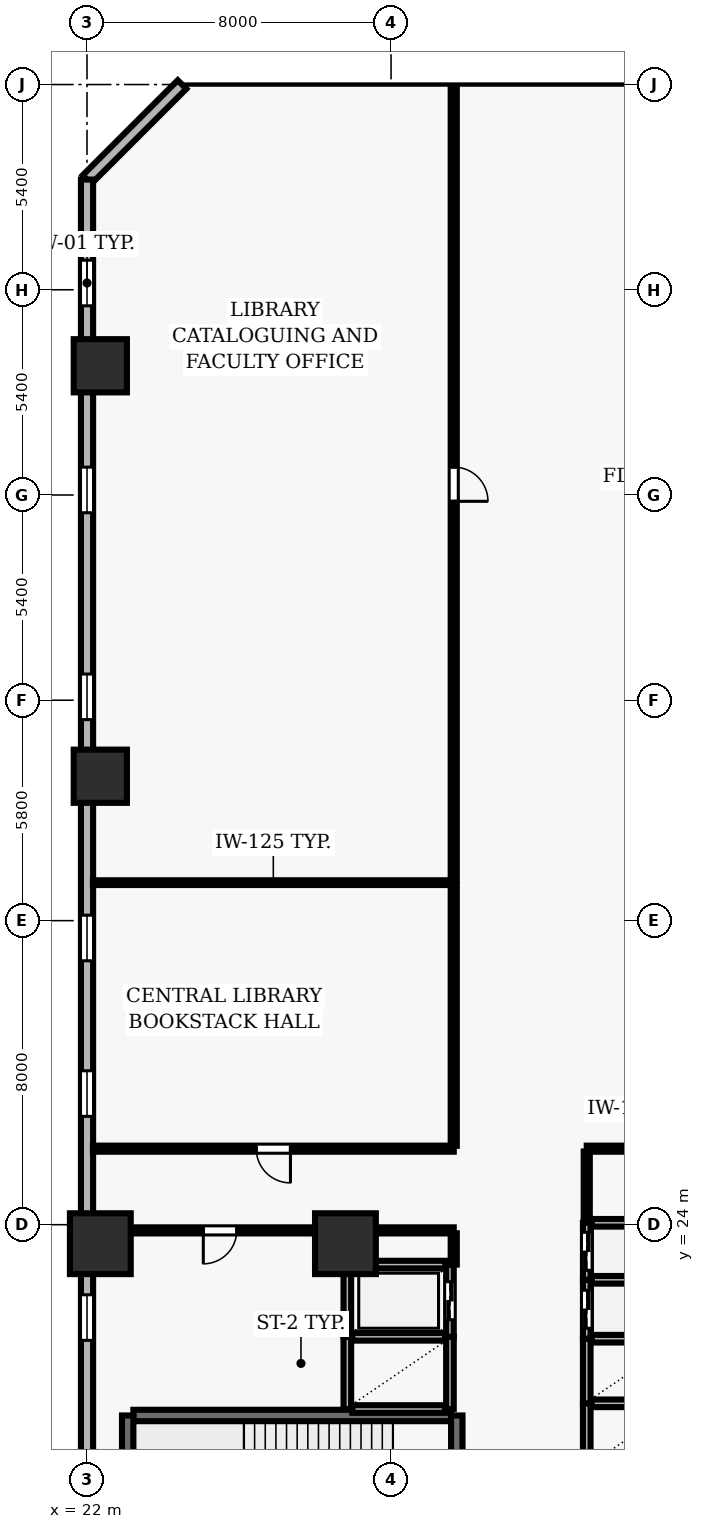
"""IFC4 building model, lengths in metres.
Left out: names, types, materials, properties, quantities, classifications, styles, units other than length and angle.
Written with IfcOpenShell. Run it as: python <this file> out.ifc"""

import sys

from ifc_helpers import new_model, si_unit, direction, frame, frame_2d, origin, origin_2d, place, context, subcontext, project, spatial, rectangle, extrude, element, fill, save


model = new_model("IFC4")
c1 = context("Model", 3, precision=1e-05, world=origin(), true_north=direction((0.0, 1.0)))
c2 = subcontext(c1, "Body", "Model", "MODEL_VIEW")
j1 = project(units=[si_unit("LENGTHUNIT", "METRE"), si_unit("PLANEANGLEUNIT", "RADIAN")], contexts=[c1])
p1 = place(None, origin())
s1 = spatial("IfcSite", under=j1, at=p1, CompositionType="ELEMENT")
p2 = place(p1, origin())
s2 = spatial("IfcBuilding", under=s1, at=p2, CompositionType="ELEMENT")
p3 = place(p2, frame((0.0, 0.0, 15.6)))
s3 = spatial("IfcBuildingStorey", under=s2, at=p3, CompositionType="ELEMENT", Elevation=15.6)
for number, where, z_axis, x_axis in (
    (1, (22.35, 23.5, 0.0), (0.0, 0.0, 1.0), (1.0, 0.0, 0.0)),
    (2, (28.8, 23.5, 0.0), (0.0, 0.0, 1.0), (1.0, 0.0, 0.0)),
):
    element("IfcColumn", number, at=place(p3, frame(where, z_axis=z_axis, x_axis=x_axis)), inside=s3, PredefinedType="COLUMN", context=c2, shape_type="SweptSolid", body=[
        extrude(rectangle(XDim=1.6, YDim=1.6, at=origin_2d()), origin(), (0.0, 0.0, 1.0), 5.2),
    ])
for number, where, z_axis, x_axis in (
    (3, (22.35, 35.8, 0.0), (0.0, 0.0, 1.0), (1.0, 0.0, 0.0)),
    (4, (22.35, 46.6, 0.0), (0.0, 0.0, 1.0), (1.0, 0.0, 0.0)),
):
    element("IfcColumn", number, at=place(p3, frame(where, z_axis=z_axis, x_axis=x_axis)), inside=s3, PredefinedType="COLUMN", context=c2, shape_type="SweptSolid", body=[
        extrude(rectangle(XDim=1.4, YDim=1.4, at=origin_2d()), origin(), (0.0, 0.0, 1.0), 5.2),
    ])
p4 = place(p3, frame((24.5, 54.0, 0.0), z_axis=(0.0, 0.0, 1.0), x_axis=(-0.707106781187, -0.707106781187, 0.0)))
e5 = element("IfcWall", 5, at=p4, inside=s3, PredefinedType="SOLIDWALL", context=c2, shape_type="SweptSolid", body=[
    extrude(rectangle(XDim=3.536, YDim=0.32, at=frame_2d((1.768, 0.0))), origin(), (0.0, 0.0, 1.0), 4.92),
])
p5 = place(p3, frame((22.0, 51.5, 0.0), z_axis=(0.0, 0.0, 1.0), x_axis=(0.0, -1.0, 0.0)))
e6 = element("IfcWall", 6, at=p5, inside=s3, PredefinedType="SOLIDWALL", context=c2, shape_type="SweptSolid", body=[
    extrude(rectangle(XDim=49.0, YDim=0.32, at=frame_2d((24.5, 0.0))), origin(), (0.0, 0.0, 1.0), 4.92),
])
p6 = place(p5, frame((2.122, 0.0, 0.9)))
e7 = element("IfcOpeningElement", 7, at=p6, cuts=e6, PredefinedType="OPENING", context=c2, shape_type="SweptSolid", body=[
    extrude(rectangle(XDim=1.2, YDim=1.6, at=frame_2d((0.6, 0.8))), frame((0.0, 0.17, 0.0), z_axis=(0.0, -1.0, 0.0), x_axis=(1.0, 0.0, 0.0)), (0.0, 0.0, 1.0), 0.34),
])
p7 = place(p5, frame((7.567, 0.0, 0.9)))
e8 = element("IfcOpeningElement", 8, at=p7, cuts=e6, PredefinedType="OPENING", context=c2, shape_type="SweptSolid", body=[
    extrude(rectangle(XDim=1.2, YDim=1.6, at=frame_2d((0.6, 0.8))), frame((0.0, 0.17, 0.0), z_axis=(0.0, -1.0, 0.0), x_axis=(1.0, 0.0, 0.0)), (0.0, 0.0, 1.0), 0.34),
])
p8 = place(p5, frame((13.011, 0.0, 0.9)))
e9 = element("IfcOpeningElement", 9, at=p8, cuts=e6, PredefinedType="OPENING", context=c2, shape_type="SweptSolid", body=[
    extrude(rectangle(XDim=1.2, YDim=1.6, at=frame_2d((0.6, 0.8))), frame((0.0, 0.17, 0.0), z_axis=(0.0, -1.0, 0.0), x_axis=(1.0, 0.0, 0.0)), (0.0, 0.0, 1.0), 0.34),
])
p9 = place(p5, frame((19.356, 0.0, 0.9)))
e10 = element("IfcOpeningElement", 10, at=p9, cuts=e6, PredefinedType="OPENING", context=c2, shape_type="SweptSolid", body=[
    extrude(rectangle(XDim=1.2, YDim=1.6, at=frame_2d((0.6, 0.8))), frame((0.0, 0.17, 0.0), z_axis=(0.0, -1.0, 0.0), x_axis=(1.0, 0.0, 0.0)), (0.0, 0.0, 1.0), 0.34),
])
p10 = place(p5, frame((23.45, 0.0, 0.9)))
e11 = element("IfcOpeningElement", 11, at=p10, cuts=e6, PredefinedType="OPENING", context=c2, shape_type="SweptSolid", body=[
    extrude(rectangle(XDim=1.2, YDim=1.6, at=frame_2d((0.6, 0.8))), frame((0.0, 0.17, 0.0), z_axis=(0.0, -1.0, 0.0), x_axis=(1.0, 0.0, 0.0)), (0.0, 0.0, 1.0), 0.34),
])
p11 = place(p5, frame((29.344, 0.0, 0.9)))
e12 = element("IfcOpeningElement", 12, at=p11, cuts=e6, PredefinedType="OPENING", context=c2, shape_type="SweptSolid", body=[
    extrude(rectangle(XDim=1.2, YDim=1.6, at=frame_2d((0.6, 0.8))), frame((0.0, 0.17, 0.0), z_axis=(0.0, -1.0, 0.0), x_axis=(1.0, 0.0, 0.0)), (0.0, 0.0, 1.0), 0.34),
])
p12 = place(p5, frame((34.339, 0.0, 0.9)))
e13 = element("IfcOpeningElement", 13, at=p12, cuts=e6, PredefinedType="OPENING", context=c2, shape_type="SweptSolid", body=[
    extrude(rectangle(XDim=1.2, YDim=1.6, at=frame_2d((0.6, 0.8))), frame((0.0, 0.17, 0.0), z_axis=(0.0, -1.0, 0.0), x_axis=(1.0, 0.0, 0.0)), (0.0, 0.0, 1.0), 0.34),
])
p13 = place(p5, frame((40.233, 0.0, 0.9)))
e14 = element("IfcOpeningElement", 14, at=p13, cuts=e6, PredefinedType="OPENING", context=c2, shape_type="SweptSolid", body=[
    extrude(rectangle(XDim=1.2, YDim=1.6, at=frame_2d((0.6, 0.8))), frame((0.0, 0.17, 0.0), z_axis=(0.0, -1.0, 0.0), x_axis=(1.0, 0.0, 0.0)), (0.0, 0.0, 1.0), 0.34),
])
p14 = place(p5, frame((44.778, 0.0, 0.9)))
e15 = element("IfcOpeningElement", 15, at=p14, cuts=e6, PredefinedType="OPENING", context=c2, shape_type="SweptSolid", body=[
    extrude(rectangle(XDim=1.2, YDim=1.6, at=frame_2d((0.6, 0.8))), frame((0.0, 0.17, 0.0), z_axis=(0.0, -1.0, 0.0), x_axis=(1.0, 0.0, 0.0)), (0.0, 0.0, 1.0), 0.34),
])
p15 = place(p3, frame((31.58, 18.98, 0.0), z_axis=(0.0, 0.0, 1.0), x_axis=(-1.0, 0.0, 0.0)))
e16 = element("IfcWall", 16, at=p15, inside=s3, PredefinedType="SHEAR", context=c2, shape_type="SweptSolid", body=[
    extrude(rectangle(XDim=8.36, YDim=0.3, at=frame_2d((4.18, 0.0))), origin(), (0.0, 0.0, 1.0), 4.92),
])
p16 = place(p3, frame((23.07, 18.98, 0.0), z_axis=(0.0, 0.0, 1.0), x_axis=(0.0, -1.0, 0.0)))
e17 = element("IfcWall", 17, at=p16, inside=s3, PredefinedType="SHEAR", context=c2, shape_type="SweptSolid", body=[
    extrude(rectangle(XDim=3.51, YDim=0.3, at=frame_2d((1.755, 0.0))), origin(), (0.0, 0.0, 1.0), 4.92),
])
p17 = place(p3, frame((31.73, 15.47, 0.0), z_axis=(0.0, 0.0, 1.0), x_axis=(0.0, 1.0, 0.0)))
e18 = element("IfcWall", 18, at=p17, inside=s3, PredefinedType="SHEAR", context=c2, shape_type="SweptSolid", body=[
    extrude(rectangle(XDim=3.51, YDim=0.3, at=frame_2d((1.755, 0.0))), origin(), (0.0, 0.0, 1.0), 4.92),
])
p18 = place(p17, frame((1.18, 0.0, 0.0)))
e19 = element("IfcOpeningElement", 19, at=p18, cuts=e18, PredefinedType="OPENING", context=c2, shape_type="SweptSolid", body=[
    extrude(rectangle(XDim=1.15, YDim=2.15, at=frame_2d((0.575, 1.075))), frame((0.0, 0.16, 0.0), z_axis=(0.0, -1.0, 0.0), x_axis=(1.0, 0.0, 0.0)), (0.0, 0.0, 1.0), 0.32),
])
p19 = place(p3, frame((35.15, 19.3, 0.0), z_axis=(0.0, 0.0, 1.0), x_axis=(0.0, -1.0, 0.0)))
e20 = element("IfcWall", 20, at=p19, inside=s3, PredefinedType="SOLIDWALL", context=c2, shape_type="SweptSolid", body=[
    extrude(rectangle(XDim=1.7, YDim=0.2, at=frame_2d((0.85, 0.0))), origin(), (0.0, 0.0, 1.0), 4.92),
])
p20 = place(p3, frame((37.42, 19.3, 0.0), z_axis=(0.0, 0.0, 1.0), x_axis=(-1.0, 0.0, 0.0)))
e21 = element("IfcWall", 21, at=p20, inside=s3, PredefinedType="SOLIDWALL", context=c2, shape_type="SweptSolid", body=[
    extrude(rectangle(XDim=2.14, YDim=0.2, at=frame_2d((1.07, 0.0))), origin(), (0.0, 0.0, 1.0), 4.92),
])
p21 = place(p3, frame((35.15, 21.0, 0.0), z_axis=(0.0, 0.0, 1.0), x_axis=(0.0, -1.0, 0.0)))
e22 = element("IfcWall", 22, at=p21, inside=s3, PredefinedType="SOLIDWALL", context=c2, shape_type="SweptSolid", body=[
    extrude(rectangle(XDim=1.7, YDim=0.2, at=frame_2d((0.85, 0.0))), origin(), (0.0, 0.0, 1.0), 4.92),
])
p22 = place(p3, frame((37.42, 21.0, 0.0), z_axis=(0.0, 0.0, 1.0), x_axis=(-1.0, 0.0, 0.0)))
e23 = element("IfcWall", 23, at=p22, inside=s3, PredefinedType="SOLIDWALL", context=c2, shape_type="SweptSolid", body=[
    extrude(rectangle(XDim=2.14, YDim=0.2, at=frame_2d((1.07, 0.0))), origin(), (0.0, 0.0, 1.0), 4.92),
])
for number, where, z_axis, x_axis in (
    (24, (28.85, 21.05, 0.0), (0.0, 0.0, 1.0), (0.0, -1.0, 0.0)),
    (25, (31.55, 19.15, 0.0), (0.0, 0.0, 1.0), (0.0, 1.0, 0.0)),
):
    element("IfcWall", number, at=place(p3, frame(where, z_axis=z_axis, x_axis=x_axis)), inside=s3, PredefinedType="SOLIDWALL", context=c2, shape_type="SweptSolid", body=[
        extrude(rectangle(XDim=1.9, YDim=0.2, at=frame_2d((0.95, 0.0))), origin(), (0.0, 0.0, 1.0), 4.92),
    ])
for number, where, z_axis, x_axis in (
    (26, (28.98, 19.15, 0.0), (0.0, 0.0, 1.0), (1.0, 0.0, 0.0)),
    (27, (31.42, 21.05, 0.0), (0.0, 0.0, 1.0), (-1.0, 0.0, 0.0)),
):
    element("IfcWall", number, at=place(p3, frame(where, z_axis=z_axis, x_axis=x_axis)), inside=s3, PredefinedType="SOLIDWALL", context=c2, shape_type="SweptSolid", body=[
        extrude(rectangle(XDim=2.44, YDim=0.2, at=frame_2d((1.22, 0.0))), origin(), (0.0, 0.0, 1.0), 4.92),
    ])
p23 = place(p3, frame((35.15, 22.55, 0.0), z_axis=(0.0, 0.0, 1.0), x_axis=(0.0, -1.0, 0.0)))
e28 = element("IfcWall", 28, at=p23, inside=s3, PredefinedType="SOLIDWALL", context=c2, shape_type="SweptSolid", body=[
    extrude(rectangle(XDim=1.55, YDim=0.2, at=frame_2d((0.775, 0.0))), origin(), (0.0, 0.0, 1.0), 4.92),
])
p24 = place(p23, frame((0.275, 0.0, 0.0)))
e29 = element("IfcOpeningElement", 29, at=p24, cuts=e28, PredefinedType="OPENING", context=c2, shape_type="SweptSolid", body=[
    extrude(rectangle(XDim=1.0, YDim=2.1, at=frame_2d((0.5, 1.05))), frame((0.0, 0.11, 0.0), z_axis=(0.0, -1.0, 0.0), x_axis=(1.0, 0.0, 0.0)), (0.0, 0.0, 1.0), 0.22),
])
p25 = place(p3, frame((37.42, 22.55, 0.0), z_axis=(0.0, 0.0, 1.0), x_axis=(-1.0, 0.0, 0.0)))
e30 = element("IfcWall", 30, at=p25, inside=s3, PredefinedType="SOLIDWALL", context=c2, shape_type="SweptSolid", body=[
    extrude(rectangle(XDim=2.14, YDim=0.2, at=frame_2d((1.07, 0.0))), origin(), (0.0, 0.0, 1.0), 4.92),
])
p26 = place(p3, frame((35.15, 24.05, 0.0), z_axis=(0.0, 0.0, 1.0), x_axis=(0.0, -1.0, 0.0)))
e31 = element("IfcWall", 31, at=p26, inside=s3, PredefinedType="SOLIDWALL", context=c2, shape_type="SweptSolid", body=[
    extrude(rectangle(XDim=1.5, YDim=0.2, at=frame_2d((0.75, 0.0))), origin(), (0.0, 0.0, 1.0), 4.92),
])
p27 = place(p26, frame((0.25, 0.0, 0.0)))
e32 = element("IfcOpeningElement", 32, at=p27, cuts=e31, PredefinedType="OPENING", context=c2, shape_type="SweptSolid", body=[
    extrude(rectangle(XDim=1.0, YDim=2.1, at=frame_2d((0.5, 1.05))), frame((0.0, 0.11, 0.0), z_axis=(0.0, -1.0, 0.0), x_axis=(1.0, 0.0, 0.0)), (0.0, 0.0, 1.0), 0.22),
])
p28 = place(p3, frame((37.42, 24.05, 0.0), z_axis=(0.0, 0.0, 1.0), x_axis=(-1.0, 0.0, 0.0)))
e33 = element("IfcWall", 33, at=p28, inside=s3, PredefinedType="SOLIDWALL", context=c2, shape_type="SweptSolid", body=[
    extrude(rectangle(XDim=2.14, YDim=0.2, at=frame_2d((1.07, 0.0))), origin(), (0.0, 0.0, 1.0), 4.92),
])
p29 = place(p3, frame((28.85, 22.95, 0.0), z_axis=(0.0, 0.0, 1.0), x_axis=(0.0, -1.0, 0.0)))
e34 = element("IfcWall", 34, at=p29, inside=s3, PredefinedType="SOLIDWALL", context=c2, shape_type="SweptSolid", body=[
    extrude(rectangle(XDim=1.9, YDim=0.2, at=frame_2d((0.95, 0.0))), origin(), (0.0, 0.0, 1.0), 4.92),
])
p30 = place(p3, frame((31.55, 21.05, 0.0), z_axis=(0.0, 0.0, 1.0), x_axis=(0.0, 1.0, 0.0)))
e35 = element("IfcWall", 35, at=p30, inside=s3, PredefinedType="SOLIDWALL", context=c2, shape_type="SweptSolid", body=[
    extrude(rectangle(XDim=1.9, YDim=0.2, at=frame_2d((0.95, 0.0))), origin(), (0.0, 0.0, 1.0), 4.92),
])
p31 = place(p30, frame((0.45, 0.0, 0.0)))
e36 = element("IfcOpeningElement", 36, at=p31, cuts=e35, PredefinedType="OPENING", context=c2, shape_type="SweptSolid", body=[
    extrude(rectangle(XDim=1.0, YDim=2.1, at=frame_2d((0.5, 1.05))), frame((0.0, 0.11, 0.0), z_axis=(0.0, -1.0, 0.0), x_axis=(1.0, 0.0, 0.0)), (0.0, 0.0, 1.0), 0.22),
])
p32 = place(p3, frame((31.43, 22.95, 0.0), z_axis=(0.0, 0.0, 1.0), x_axis=(-1.0, 0.0, 0.0)))
e37 = element("IfcWall", 37, at=p32, inside=s3, PredefinedType="SOLIDWALL", context=c2, shape_type="SweptSolid", body=[
    extrude(rectangle(XDim=2.46, YDim=0.2, at=frame_2d((1.23, 0.0))), origin(), (0.0, 0.0, 1.0), 4.92),
])
p33 = place(p3, frame((28.8, 23.85, 0.0), z_axis=(0.0, 0.0, 1.0), x_axis=(-1.0, 0.0, 0.0)))
e38 = element("IfcWall", 38, at=p33, inside=s3, PredefinedType="PARTITIONING", context=c2, shape_type="SweptSolid", body=[
    extrude(rectangle(XDim=6.6, YDim=0.16, at=frame_2d((3.3, 0.0))), origin(), (0.0, 0.0, 1.0), 4.065),
])
p34 = place(p33, frame((2.86, 0.0, 0.0)))
e39 = element("IfcOpeningElement", 39, at=p34, cuts=e38, PredefinedType="OPENING", context=c2, shape_type="SweptSolid", body=[
    extrude(rectangle(XDim=0.88, YDim=2.1, at=frame_2d((0.44, 1.05))), frame((0.0, 0.09, 0.0), z_axis=(0.0, -1.0, 0.0), x_axis=(1.0, 0.0, 0.0)), (0.0, 0.0, 1.0), 0.18),
])
p35 = place(p3, frame((28.8, 23.85, 0.0), z_axis=(0.0, 0.0, 1.0), x_axis=(1.0, 0.0, 0.0)))
e40 = element("IfcWall", 40, at=p35, inside=s3, PredefinedType="PARTITIONING", context=c2, shape_type="SweptSolid", body=[
    extrude(rectangle(XDim=2.85, YDim=0.16, at=frame_2d((1.425, 0.0))), origin(), (0.0, 0.0, 1.0), 4.92),
])
p36 = place(p3, frame((31.65, 26.0, 0.0), z_axis=(0.0, 0.0, 1.0), x_axis=(-1.0, 0.0, 0.0)))
e41 = element("IfcWall", 41, at=p36, inside=s3, PredefinedType="PARTITIONING", context=c2, shape_type="SweptSolid", body=[
    extrude(rectangle(XDim=9.495, YDim=0.16, at=frame_2d((4.748, 0.0))), origin(), (0.0, 0.0, 1.0), 4.92),
])
p37 = place(p36, frame((4.297, 0.0, 0.0)))
e42 = element("IfcOpeningElement", 42, at=p37, cuts=e41, PredefinedType="OPENING", context=c2, shape_type="SweptSolid", body=[
    extrude(rectangle(XDim=0.9, YDim=2.1, at=frame_2d((0.45, 1.05))), frame((0.0, 0.09, 0.0), z_axis=(0.0, -1.0, 0.0), x_axis=(1.0, 0.0, 0.0)), (0.0, 0.0, 1.0), 0.18),
])
p38 = place(p3, frame((31.65, 33.0, 0.0), z_axis=(0.0, 0.0, 1.0), x_axis=(-1.0, 0.0, 0.0)))
e43 = element("IfcWall", 43, at=p38, inside=s3, PredefinedType="PARTITIONING", context=c2, shape_type="SweptSolid", body=[
    extrude(rectangle(XDim=9.495, YDim=0.125, at=frame_2d((4.748, 0.0))), origin(), (0.0, 0.0, 1.0), 4.451),
])
p39 = place(p3, frame((35.15, 26.0, 0.0), z_axis=(0.0, 0.0, 1.0), x_axis=(1.0, 0.0, 0.0)))
e44 = element("IfcWall", 44, at=p39, inside=s3, PredefinedType="PARTITIONING", context=c2, shape_type="SweptSolid", body=[
    extrude(rectangle(XDim=3.1, YDim=0.16, at=frame_2d((1.55, 0.0))), origin(), (0.0, 0.0, 1.0), 4.92),
])
p40 = place(p3, frame((28.8, 22.95, 0.0), z_axis=(0.0, 0.0, 1.0), x_axis=(0.0, 1.0, 0.0)))
e45 = element("IfcWall", 45, at=p40, inside=s3, PredefinedType="PARTITIONING", context=c2, shape_type="SweptSolid", body=[
    extrude(rectangle(XDim=0.825, YDim=0.135, at=frame_2d((0.413, 0.0))), origin(), (0.0, 0.0, 1.0), 4.92),
])
p41 = place(p3, frame((31.65, 23.775, 0.0), z_axis=(0.0, 0.0, 1.0), x_axis=(0.0, -1.0, 0.0)))
e46 = element("IfcWall", 46, at=p41, inside=s3, PredefinedType="PARTITIONING", context=c2, shape_type="SweptSolid", body=[
    extrude(rectangle(XDim=0.825, YDim=0.16, at=frame_2d((0.413, 0.0))), origin(), (0.0, 0.0, 1.0), 4.92),
])
p42 = place(p3, frame((31.65, 32.943, 0.0), z_axis=(0.0, 0.0, 1.0), x_axis=(0.0, -1.0, 0.0)))
e47 = element("IfcWall", 47, at=p42, inside=s3, PredefinedType="PARTITIONING", context=c2, shape_type="SweptSolid", body=[
    extrude(rectangle(XDim=6.868, YDim=0.16, at=frame_2d((3.434, 0.0))), origin(), (0.0, 0.0, 1.0), 4.92),
])
p43 = place(p3, frame((31.65, 53.91, 0.0), z_axis=(0.0, 0.0, 1.0), x_axis=(0.0, -1.0, 0.0)))
e48 = element("IfcWall", 48, at=p43, inside=s3, PredefinedType="PARTITIONING", context=c2, shape_type="SweptSolid", body=[
    extrude(rectangle(XDim=20.853, YDim=0.16, at=frame_2d((10.427, 0.0))), origin(), (0.0, 0.0, 1.0), 4.92),
])
p44 = place(p43, frame((9.976, 0.0, 0.0)))
e49 = element("IfcOpeningElement", 49, at=p44, cuts=e48, PredefinedType="OPENING", context=c2, shape_type="SweptSolid", body=[
    extrude(rectangle(XDim=0.9, YDim=2.1, at=frame_2d((0.45, 1.05))), frame((0.0, 0.09, 0.0), z_axis=(0.0, -1.0, 0.0), x_axis=(1.0, 0.0, 0.0)), (0.0, 0.0, 1.0), 0.18),
])
p45 = place(p3, frame((35.15, 24.07, 0.0), z_axis=(0.0, 0.0, 1.0), x_axis=(0.0, 1.0, 0.0)))
e50 = element("IfcWall", 50, at=p45, inside=s3, PredefinedType="PARTITIONING", context=c2, shape_type="SweptSolid", body=[
    extrude(rectangle(XDim=1.855, YDim=0.16, at=frame_2d((0.927, 0.0))), origin(), (0.0, 0.0, 1.0), 4.92),
])
p46 = place(p6, origin())
e51 = element("IfcWindow", 51, at=p46, inside=s3, PartitioningType="SINGLE_PANEL", PredefinedType="WINDOW", context=c2, shape_type="SweptSolid", body=[
    extrude(rectangle(XDim=1.2, YDim=1.6, at=frame_2d((0.6, 0.8))), frame((0.0, 0.03, 0.0), z_axis=(0.0, -1.0, 0.0), x_axis=(1.0, 0.0, 0.0)), (0.0, 0.0, 1.0), 0.06),
])
fill(e7, e51)
p47 = place(p7, origin())
e52 = element("IfcWindow", 52, at=p47, inside=s3, PartitioningType="SINGLE_PANEL", PredefinedType="WINDOW", context=c2, shape_type="SweptSolid", body=[
    extrude(rectangle(XDim=1.2, YDim=1.6, at=frame_2d((0.6, 0.8))), frame((0.0, 0.03, 0.0), z_axis=(0.0, -1.0, 0.0), x_axis=(1.0, 0.0, 0.0)), (0.0, 0.0, 1.0), 0.06),
])
fill(e8, e52)
p48 = place(p8, origin())
e53 = element("IfcWindow", 53, at=p48, inside=s3, PartitioningType="SINGLE_PANEL", PredefinedType="WINDOW", context=c2, shape_type="SweptSolid", body=[
    extrude(rectangle(XDim=1.2, YDim=1.6, at=frame_2d((0.6, 0.8))), frame((0.0, 0.03, 0.0), z_axis=(0.0, -1.0, 0.0), x_axis=(1.0, 0.0, 0.0)), (0.0, 0.0, 1.0), 0.06),
])
fill(e9, e53)
p49 = place(p9, origin())
e54 = element("IfcWindow", 54, at=p49, inside=s3, PartitioningType="SINGLE_PANEL", PredefinedType="WINDOW", context=c2, shape_type="SweptSolid", body=[
    extrude(rectangle(XDim=1.2, YDim=1.6, at=frame_2d((0.6, 0.8))), frame((0.0, 0.03, 0.0), z_axis=(0.0, -1.0, 0.0), x_axis=(1.0, 0.0, 0.0)), (0.0, 0.0, 1.0), 0.06),
])
fill(e10, e54)
p50 = place(p10, origin())
e55 = element("IfcWindow", 55, at=p50, inside=s3, PartitioningType="SINGLE_PANEL", PredefinedType="WINDOW", context=c2, shape_type="SweptSolid", body=[
    extrude(rectangle(XDim=1.2, YDim=1.6, at=frame_2d((0.6, 0.8))), frame((0.0, 0.03, 0.0), z_axis=(0.0, -1.0, 0.0), x_axis=(1.0, 0.0, 0.0)), (0.0, 0.0, 1.0), 0.06),
])
fill(e11, e55)
p51 = place(p11, origin())
e56 = element("IfcWindow", 56, at=p51, inside=s3, PartitioningType="SINGLE_PANEL", PredefinedType="WINDOW", context=c2, shape_type="SweptSolid", body=[
    extrude(rectangle(XDim=1.2, YDim=1.6, at=frame_2d((0.6, 0.8))), frame((0.0, 0.03, 0.0), z_axis=(0.0, -1.0, 0.0), x_axis=(1.0, 0.0, 0.0)), (0.0, 0.0, 1.0), 0.06),
])
fill(e12, e56)
p52 = place(p24, origin())
e57 = element("IfcDoor", 57, at=p52, inside=s3, OperationType="DOUBLE_DOOR_SLIDING", PredefinedType="DOOR", context=c2, shape_type="SweptSolid", body=[
    extrude(rectangle(XDim=1.0, YDim=2.1, at=frame_2d((0.5, 1.05))), frame((0.0, 0.025, 0.0), z_axis=(0.0, -1.0, 0.0), x_axis=(1.0, 0.0, 0.0)), (0.0, 0.0, 1.0), 0.05),
])
fill(e29, e57)
p53 = place(p27, origin())
e58 = element("IfcDoor", 58, at=p53, inside=s3, OperationType="DOUBLE_DOOR_SLIDING", PredefinedType="DOOR", context=c2, shape_type="SweptSolid", body=[
    extrude(rectangle(XDim=1.0, YDim=2.1, at=frame_2d((0.5, 1.05))), frame((0.0, 0.025, 0.0), z_axis=(0.0, -1.0, 0.0), x_axis=(1.0, 0.0, 0.0)), (0.0, 0.0, 1.0), 0.05),
])
fill(e32, e58)
p54 = place(p31, origin())
e59 = element("IfcDoor", 59, at=p54, inside=s3, OperationType="DOUBLE_DOOR_SLIDING", PredefinedType="DOOR", context=c2, shape_type="SweptSolid", body=[
    extrude(rectangle(XDim=1.0, YDim=2.1, at=frame_2d((0.5, 1.05))), frame((0.0, 0.025, 0.0), z_axis=(0.0, -1.0, 0.0), x_axis=(1.0, 0.0, 0.0)), (0.0, 0.0, 1.0), 0.05),
])
fill(e36, e59)
p55 = place(p34, origin())
e60 = element("IfcDoor", 60, at=p55, inside=s3, OperationType="SINGLE_SWING_RIGHT", PredefinedType="DOOR", context=c2, shape_type="SweptSolid", body=[
    extrude(rectangle(XDim=0.88, YDim=2.1, at=frame_2d((0.44, 1.05))), frame((0.0, 0.025, 0.0), z_axis=(0.0, -1.0, 0.0), x_axis=(1.0, 0.0, 0.0)), (0.0, 0.0, 1.0), 0.05),
])
fill(e39, e60)
p56 = place(p37, origin())
e61 = element("IfcDoor", 61, at=p56, inside=s3, OperationType="SINGLE_SWING_LEFT", PredefinedType="DOOR", context=c2, shape_type="SweptSolid", body=[
    extrude(rectangle(XDim=0.9, YDim=2.1, at=frame_2d((0.45, 1.05))), frame((0.0, 0.025, 0.0), z_axis=(0.0, -1.0, 0.0), x_axis=(1.0, 0.0, 0.0)), (0.0, 0.0, 1.0), 0.05),
])
fill(e42, e61)
p57 = place(p44, origin())
e62 = element("IfcDoor", 62, at=p57, inside=s3, OperationType="SINGLE_SWING_RIGHT", PredefinedType="DOOR", context=c2, shape_type="SweptSolid", body=[
    extrude(rectangle(XDim=0.9, YDim=2.1, at=frame_2d((0.45, 1.05))), frame((0.0, 0.025, 0.0), z_axis=(0.0, -1.0, 0.0), x_axis=(1.0, 0.0, 0.0)), (0.0, 0.0, 1.0), 0.05),
])
fill(e49, e62)
save(model, sys.argv[1])
